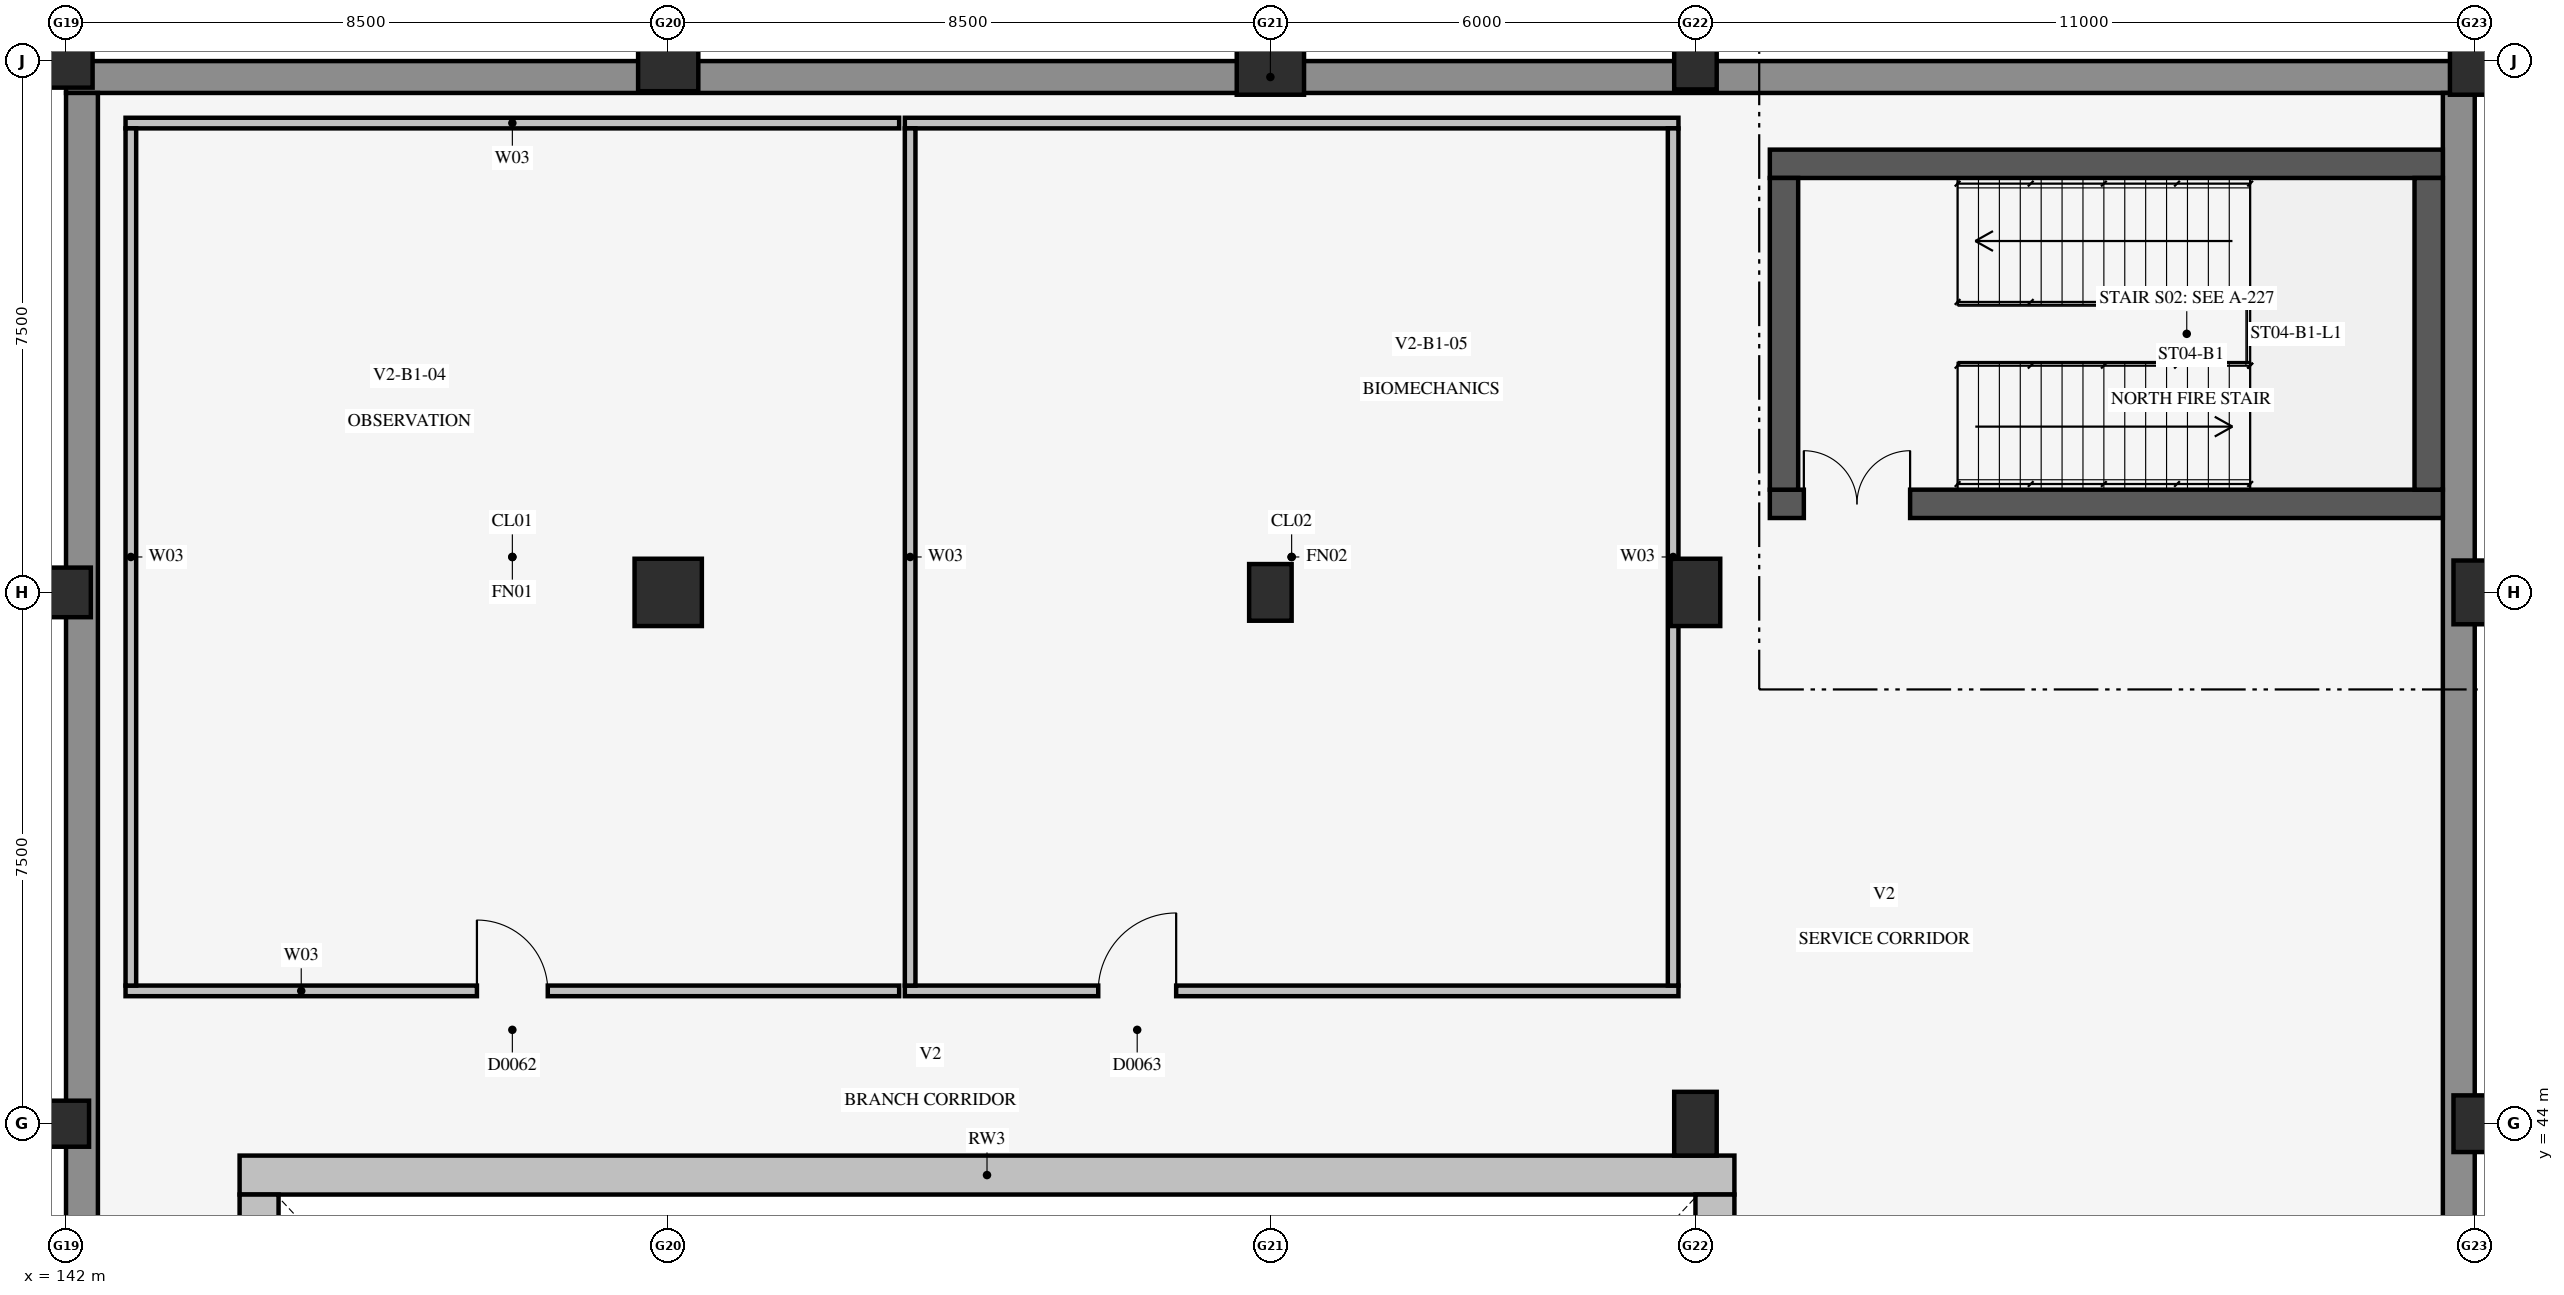
"""IFC4 building model, lengths in metres.
Left out: names, types, materials, properties, quantities, classifications, styles, units other than length and angle.
Written with IfcOpenShell. Run it as: python <this file> out.ifc"""

import sys

from ifc_helpers import new_model, si_unit, direction, frame, frame_2d, origin, origin_2d, place, context, subcontext, project, spatial, rectangle, extrude, element, fill, save


model = new_model("IFC4")
c1 = context("Model", 3, precision=1e-05, world=origin(), true_north=direction((0.0, 1.0)))
c2 = subcontext(c1, "Body", "Model", "MODEL_VIEW")
j1 = project(units=[si_unit("LENGTHUNIT", "METRE"), si_unit("PLANEANGLEUNIT", "RADIAN")], contexts=[c1])
p1 = place(None, origin())
s1 = spatial("IfcSite", under=j1, at=p1, CompositionType="ELEMENT")
p2 = place(p1, origin())
s2 = spatial("IfcBuilding", under=s1, at=p2, CompositionType="ELEMENT")
p3 = place(p2, frame((0.0, 0.0, -5.2)))
s3 = spatial("IfcBuildingStorey", under=s2, at=p3, CompositionType="ELEMENT", Elevation=-5.2)
p4 = place(p3, frame((144.45, 43.275, 0.2), z_axis=(0.0, 0.0, 1.0), x_axis=(1.0, 0.0, 0.0)))
e1 = element("IfcWall", 1, at=p4, inside=s3, PredefinedType="USERDEFINED", context=c2, shape_type="SweptSolid", body=[
    extrude(rectangle(XDim=21.1, YDim=0.55, at=frame_2d((10.55, 0.0))), origin(), (0.0, 0.0, 1.0), 4.72),
])
for number, where, z_axis, x_axis in (
    (2, (144.725, 21.5, 0.2), (0.0, 0.0, 1.0), (0.0, 1.0, 0.0)),
    (3, (165.275, 21.5, 0.2), (0.0, 0.0, 1.0), (0.0, 1.0, 0.0)),
):
    element("IfcWall", number, at=place(p3, frame(where, z_axis=z_axis, x_axis=x_axis)), inside=s3, PredefinedType="USERDEFINED", context=c2, shape_type="SweptSolid", body=[
        extrude(rectangle(XDim=21.5, YDim=0.55, at=frame_2d((10.75, 0.0))), origin(), (0.0, 0.0, 1.0), 4.72),
    ])
p5 = place(p3, frame((142.0, 58.775, 0.0), z_axis=(0.0, 0.0, 1.0), x_axis=(1.0, 0.0, 0.0)))
e4 = element("IfcWall", 4, at=p5, inside=s3, PredefinedType="USERDEFINED", context=c2, shape_type="SweptSolid", body=[
    extrude(rectangle(XDim=34.0, YDim=0.45, at=frame_2d((17.0, 0.0))), origin(), (0.0, 0.0, 1.0), 4.92),
])
for number, where, z_axis, x_axis in (
    (5, (142.225, 6.95, 0.0), (0.0, 0.0, 1.0), (0.0, 1.0, 0.0)),
    (6, (175.775, 6.95, 0.0), (0.0, 0.0, 1.0), (0.0, 1.0, 0.0)),
):
    element("IfcWall", number, at=place(p3, frame(where, z_axis=z_axis, x_axis=x_axis)), inside=s3, PredefinedType="USERDEFINED", context=c2, shape_type="SweptSolid", body=[
        extrude(rectangle(XDim=51.6, YDim=0.45, at=frame_2d((25.8, 0.0))), origin(), (0.0, 0.0, 1.0), 4.92),
    ])
p6 = place(p3, frame((166.05, 52.75, 0.0), z_axis=(0.0, 0.0, 1.0), x_axis=(1.0, 0.0, 0.0)))
e7 = element("IfcWall", 7, at=p6, inside=s3, PredefinedType="SHEAR", context=c2, shape_type="SweptSolid", body=[
    extrude(rectangle(XDim=9.5, YDim=0.4, at=frame_2d((4.75, 0.0))), origin(), (0.0, 0.0, 1.0), 4.92),
])
p7 = place(p6, frame((0.48, 0.0, 0.0)))
e8 = element("IfcOpeningElement", 8, at=p7, cuts=e7, PredefinedType="OPENING", context=c2, shape_type="SweptSolid", body=[
    extrude(rectangle(XDim=1.5, YDim=2.3, at=frame_2d((0.75, 1.15))), frame((0.0, 0.212, 0.0), z_axis=(0.0, -1.0, 0.0), x_axis=(1.0, 0.0, 0.0)), (0.0, 0.0, 1.0), 0.424),
])
p8 = place(p3, frame((166.05, 57.55, 0.0), z_axis=(0.0, 0.0, 1.0), x_axis=(1.0, 0.0, 0.0)))
e9 = element("IfcWall", 9, at=p8, inside=s3, PredefinedType="SHEAR", context=c2, shape_type="SweptSolid", body=[
    extrude(rectangle(XDim=9.5, YDim=0.4, at=frame_2d((4.75, 0.0))), origin(), (0.0, 0.0, 1.0), 4.92),
])
for number, where, z_axis, x_axis in (
    (10, (166.25, 52.95, 0.0), (0.0, 0.0, 1.0), (0.0, 1.0, 0.0)),
    (11, (175.35, 52.95, 0.0), (0.0, 0.0, 1.0), (0.0, 1.0, 0.0)),
):
    element("IfcWall", number, at=place(p3, frame(where, z_axis=z_axis, x_axis=x_axis)), inside=s3, PredefinedType="SHEAR", context=c2, shape_type="SweptSolid", body=[
        extrude(rectangle(XDim=4.4, YDim=0.4, at=frame_2d((2.2, 0.0))), origin(), (0.0, 0.0, 1.0), 4.92),
    ])
p9 = place(p3, frame((142.0, 44.0, 0.0), z_axis=(0.0, 0.0, 1.0), x_axis=(1.0, 0.0, 0.0)))
e12 = element("IfcColumn", 12, at=p9, inside=s3, PredefinedType="COLUMN", context=c2, shape_type="SweptSolid", body=[
    extrude(rectangle(XDim=0.65, YDim=0.65, at=origin_2d()), origin(), (0.0, 0.0, 1.0), 5.2),
])
p10 = place(p3, frame((142.0, 51.5, 0.0), z_axis=(0.0, 0.0, 1.0), x_axis=(1.0, 0.0, 0.0)))
e13 = element("IfcColumn", 13, at=p10, inside=s3, PredefinedType="COLUMN", context=c2, shape_type="SweptSolid", body=[
    extrude(rectangle(XDim=0.7, YDim=0.7, at=origin_2d()), origin(), (0.0, 0.0, 1.0), 5.2),
])
p11 = place(p3, frame((142.0, 59.0, 0.0), z_axis=(0.0, 0.0, 1.0), x_axis=(1.0, 0.0, 0.0)))
e14 = element("IfcColumn", 14, at=p11, inside=s3, PredefinedType="COLUMN", context=c2, shape_type="SweptSolid", body=[
    extrude(rectangle(XDim=0.75, YDim=0.75, at=origin_2d()), origin(), (0.0, 0.0, 1.0), 5.2),
])
p12 = place(p3, frame((150.5, 51.5, 0.0), z_axis=(0.0, 0.0, 1.0), x_axis=(1.0, 0.0, 0.0)))
e15 = element("IfcColumn", 15, at=p12, inside=s3, PredefinedType="COLUMN", context=c2, shape_type="SweptSolid", body=[
    extrude(rectangle(XDim=0.95, YDim=0.95, at=origin_2d()), origin(), (0.0, 0.0, 1.0), 5.2),
])
p13 = place(p3, frame((150.5, 59.0, 0.0), z_axis=(0.0, 0.0, 1.0), x_axis=(1.0, 0.0, 0.0)))
e16 = element("IfcColumn", 16, at=p13, inside=s3, PredefinedType="COLUMN", context=c2, shape_type="SweptSolid", body=[
    extrude(rectangle(XDim=0.85, YDim=0.85, at=origin_2d()), origin(), (0.0, 0.0, 1.0), 5.2),
])
p14 = place(p3, frame((159.0, 51.5, 0.0), z_axis=(0.0, 0.0, 1.0), x_axis=(1.0, 0.0, 0.0)))
e17 = element("IfcColumn", 17, at=p14, inside=s3, PredefinedType="COLUMN", context=c2, shape_type="SweptSolid", body=[
    extrude(rectangle(XDim=0.6, YDim=0.8, at=origin_2d()), origin(), (0.0, 0.0, 1.0), 5.2),
])
p15 = place(p3, frame((159.0, 59.0, 0.0), z_axis=(0.0, 0.0, 1.0), x_axis=(1.0, 0.0, 0.0)))
e18 = element("IfcColumn", 18, at=p15, inside=s3, PredefinedType="COLUMN", context=c2, shape_type="SweptSolid", body=[
    extrude(rectangle(XDim=0.95, YDim=0.95, at=origin_2d()), origin(), (0.0, 0.0, 1.0), 5.2),
])
p16 = place(p3, frame((165.0, 44.0, 0.0), z_axis=(0.0, 0.0, 1.0), x_axis=(1.0, 0.0, 0.0)))
e19 = element("IfcColumn", 19, at=p16, inside=s3, PredefinedType="COLUMN", context=c2, shape_type="SweptSolid", body=[
    extrude(rectangle(XDim=0.6, YDim=0.9, at=origin_2d()), origin(), (0.0, 0.0, 1.0), 5.2),
])
p17 = place(p3, frame((165.0, 51.5, 0.0), z_axis=(0.0, 0.0, 1.0), x_axis=(1.0, 0.0, 0.0)))
e20 = element("IfcColumn", 20, at=p17, inside=s3, PredefinedType="COLUMN", context=c2, shape_type="SweptSolid", body=[
    extrude(rectangle(XDim=0.7, YDim=0.95, at=origin_2d()), origin(), (0.0, 0.0, 1.0), 5.2),
])
for number, where, z_axis, x_axis in (
    (21, (165.0, 59.0, 0.0), (0.0, 0.0, 1.0), (1.0, 0.0, 0.0)),
    (22, (176.0, 44.0, 0.0), (0.0, 0.0, 1.0), (1.0, 0.0, 0.0)),
):
    element("IfcColumn", number, at=place(p3, frame(where, z_axis=z_axis, x_axis=x_axis)), inside=s3, PredefinedType="COLUMN", context=c2, shape_type="SweptSolid", body=[
        extrude(rectangle(XDim=0.6, YDim=0.8, at=origin_2d()), origin(), (0.0, 0.0, 1.0), 5.2),
    ])
p18 = place(p3, frame((176.0, 51.5, 0.0), z_axis=(0.0, 0.0, 1.0), x_axis=(1.0, 0.0, 0.0)))
e23 = element("IfcColumn", 23, at=p18, inside=s3, PredefinedType="COLUMN", context=c2, shape_type="SweptSolid", body=[
    extrude(rectangle(XDim=0.6, YDim=0.9, at=origin_2d()), origin(), (0.0, 0.0, 1.0), 5.2),
])
p19 = place(p3, frame((176.0, 59.0, 0.0), z_axis=(0.0, 0.0, 1.0), x_axis=(1.0, 0.0, 0.0)))
e24 = element("IfcColumn", 24, at=p19, inside=s3, PredefinedType="COLUMN", context=c2, shape_type="SweptSolid", body=[
    extrude(rectangle(XDim=0.7, YDim=0.95, at=origin_2d()), origin(), (0.0, 0.0, 1.0), 5.2),
])
p20 = place(p3, frame((142.84, 45.875, 0.0), z_axis=(0.0, 0.0, 1.0), x_axis=(1.0, 0.0, 0.0)))
e25 = element("IfcWall", 25, at=p20, inside=s3, PredefinedType="PARTITIONING", context=c2, shape_type="SweptSolid", body=[
    extrude(rectangle(XDim=10.92, YDim=0.15, at=frame_2d((5.46, 0.0))), origin(), (0.0, 0.0, 1.0), 4.905),
])
p21 = place(p20, frame((4.96, 0.0, 0.0)))
e26 = element("IfcOpeningElement", 26, at=p21, cuts=e25, PredefinedType="OPENING", context=c2, shape_type="SweptSolid", body=[
    extrude(rectangle(XDim=1.0, YDim=2.2, at=frame_2d((0.5, 1.1))), frame((0.0, 0.087, 0.0), z_axis=(0.0, -1.0, 0.0), x_axis=(1.0, 0.0, 0.0)), (0.0, 0.0, 1.0), 0.174),
])
p22 = place(p3, frame((142.84, 58.125, 0.0), z_axis=(0.0, 0.0, 1.0), x_axis=(1.0, 0.0, 0.0)))
e27 = element("IfcWall", 27, at=p22, inside=s3, PredefinedType="PARTITIONING", context=c2, shape_type="SweptSolid", body=[
    extrude(rectangle(XDim=10.92, YDim=0.15, at=frame_2d((5.46, 0.0))), origin(), (0.0, 0.0, 1.0), 4.905),
])
p23 = place(p3, frame((142.915, 45.95, 0.0), z_axis=(0.0, 0.0, 1.0), x_axis=(0.0, 1.0, 0.0)))
e28 = element("IfcWall", 28, at=p23, inside=s3, PredefinedType="PARTITIONING", context=c2, shape_type="SweptSolid", body=[
    extrude(rectangle(XDim=12.1, YDim=0.15, at=frame_2d((6.05, 0.0))), origin(), (0.0, 0.0, 1.0), 4.905),
])
p24 = place(p3, frame((153.84, 45.875, 0.0), z_axis=(0.0, 0.0, 1.0), x_axis=(1.0, 0.0, 0.0)))
e29 = element("IfcWall", 29, at=p24, inside=s3, PredefinedType="PARTITIONING", context=c2, shape_type="SweptSolid", body=[
    extrude(rectangle(XDim=10.92, YDim=0.15, at=frame_2d((5.46, 0.0))), origin(), (0.0, 0.0, 1.0), 4.905),
])
p25 = place(p24, frame((2.73, 0.0, 0.0)))
e30 = element("IfcOpeningElement", 30, at=p25, cuts=e29, PredefinedType="OPENING", context=c2, shape_type="SweptSolid", body=[
    extrude(rectangle(XDim=1.1, YDim=2.25, at=frame_2d((0.55, 1.125))), frame((0.0, 0.087, 0.0), z_axis=(0.0, -1.0, 0.0), x_axis=(1.0, 0.0, 0.0)), (0.0, 0.0, 1.0), 0.174),
])
p26 = place(p3, frame((153.84, 58.125, 0.0), z_axis=(0.0, 0.0, 1.0), x_axis=(1.0, 0.0, 0.0)))
e31 = element("IfcWall", 31, at=p26, inside=s3, PredefinedType="PARTITIONING", context=c2, shape_type="SweptSolid", body=[
    extrude(rectangle(XDim=10.92, YDim=0.15, at=frame_2d((5.46, 0.0))), origin(), (0.0, 0.0, 1.0), 4.905),
])
p27 = place(p3, frame((164.685, 45.95, 0.0), z_axis=(0.0, 0.0, 1.0), x_axis=(0.0, 1.0, 0.0)))
e32 = element("IfcWall", 32, at=p27, inside=s3, PredefinedType="PARTITIONING", context=c2, shape_type="SweptSolid", body=[
    extrude(rectangle(XDim=12.1, YDim=0.15, at=frame_2d((6.05, 0.0))), origin(), (0.0, 0.0, 1.0), 3.64),
])
p28 = place(p3, frame((153.915, 45.95, 0.0), z_axis=(0.0, 0.0, 1.0), x_axis=(0.0, 1.0, 0.0)))
e33 = element("IfcWall", 33, at=p28, inside=s3, PredefinedType="PARTITIONING", context=c2, shape_type="SweptSolid", body=[
    extrude(rectangle(XDim=12.1, YDim=0.15, at=frame_2d((6.05, 0.0))), origin(), (0.0, 0.0, 1.0), 4.905),
])
p29 = place(p7, origin())
e34 = element("IfcDoor", 34, at=p29, inside=s3, OperationType="DOUBLE_DOOR_SINGLE_SWING", PredefinedType="DOOR", context=c2, shape_type="SweptSolid", body=[
    extrude(rectangle(XDim=1.5, YDim=2.3, at=frame_2d((0.75, 1.15))), frame((0.0, 0.025, 0.0), z_axis=(0.0, -1.0, 0.0), x_axis=(1.0, 0.0, 0.0)), (0.0, 0.0, 1.0), 0.05),
])
fill(e8, e34)
p30 = place(p21, origin())
e35 = element("IfcDoor", 35, at=p30, inside=s3, OperationType="SINGLE_SWING_LEFT", PredefinedType="DOOR", context=c2, shape_type="SweptSolid", body=[
    extrude(rectangle(XDim=1.0, YDim=2.2, at=frame_2d((0.5, 1.1))), frame((0.0, 0.025, 0.0), z_axis=(0.0, -1.0, 0.0), x_axis=(1.0, 0.0, 0.0)), (0.0, 0.0, 1.0), 0.05),
])
fill(e26, e35)
p31 = place(p25, origin())
e36 = element("IfcDoor", 36, at=p31, inside=s3, OperationType="SINGLE_SWING_RIGHT", PredefinedType="DOOR", context=c2, shape_type="SweptSolid", body=[
    extrude(rectangle(XDim=1.1, YDim=2.25, at=frame_2d((0.55, 1.125))), frame((0.0, 0.025, 0.0), z_axis=(0.0, -1.0, 0.0), x_axis=(1.0, 0.0, 0.0)), (0.0, 0.0, 1.0), 0.05),
])
fill(e30, e36)
save(model, sys.argv[1])
